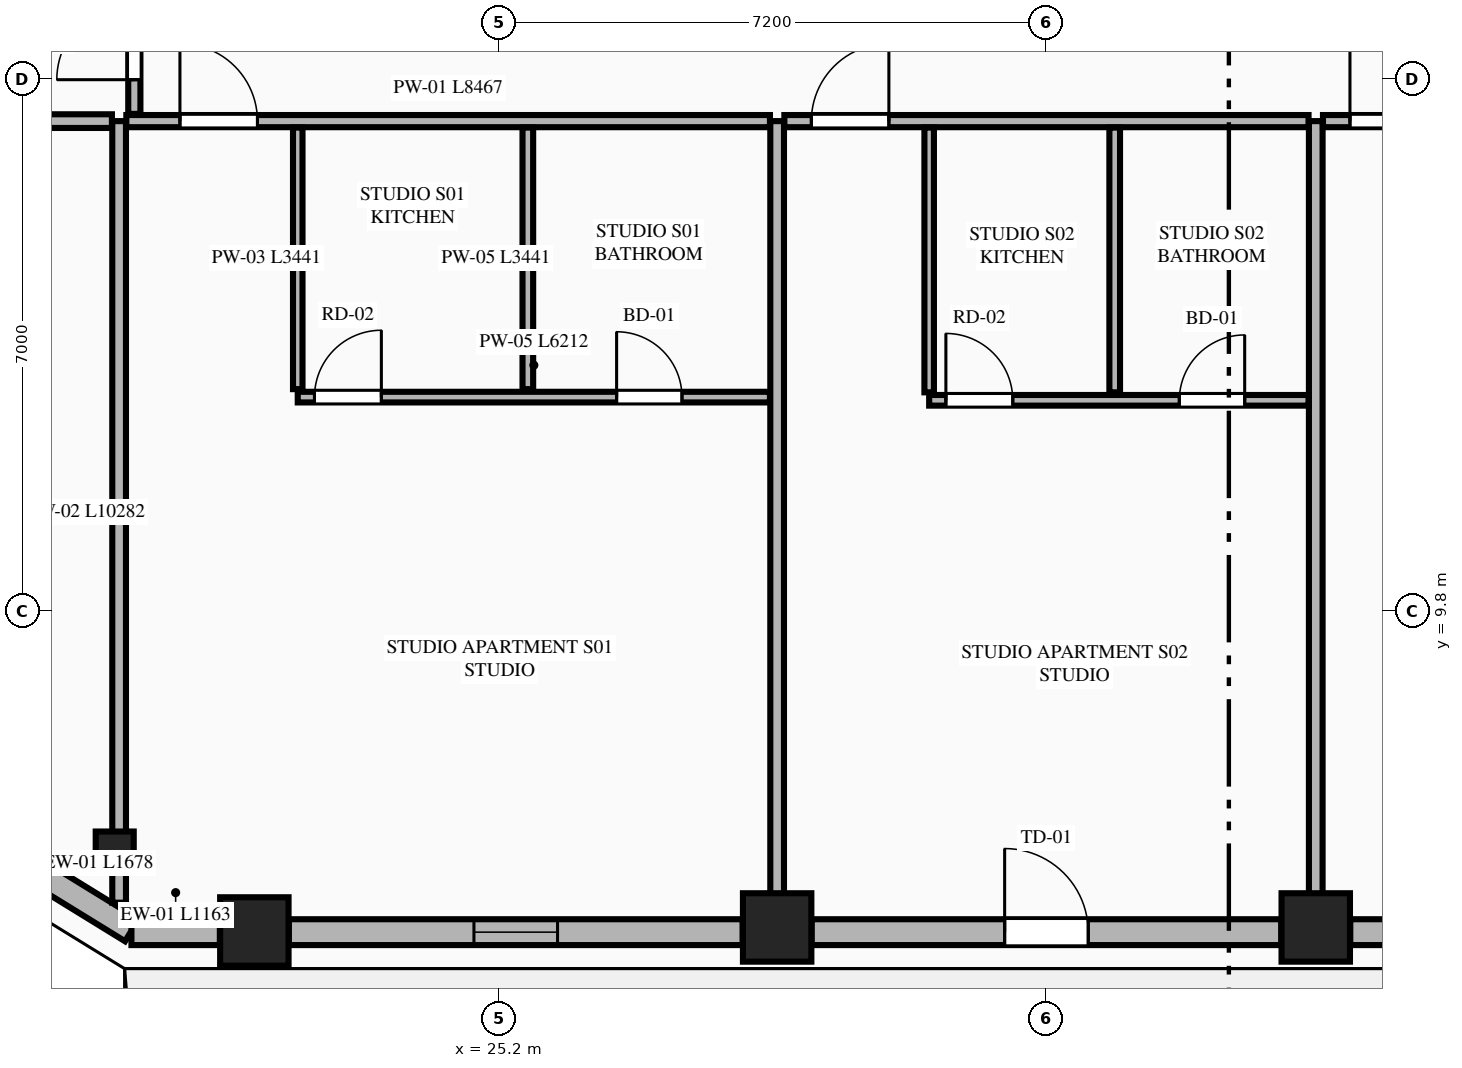
"""IFC4 building model, lengths in metres.
Left out: names, types, materials, properties, quantities, classifications, styles, units other than length and angle.
Written with IfcOpenShell. Run it as: python <this file> out.ifc"""

import sys

from ifc_helpers import new_model, si_unit, direction, frame, frame_2d, origin, origin_2d, place, context, subcontext, project, spatial, rectangle, extrude, element, fill, save


model = new_model("IFC4")
c1 = context("Model", 3, precision=1e-05, world=origin(), true_north=direction((0.0, 1.0)))
c2 = subcontext(c1, "Body", "Model", "MODEL_VIEW")
j1 = project(units=[si_unit("LENGTHUNIT", "METRE"), si_unit("PLANEANGLEUNIT", "RADIAN")], contexts=[c1])
p1 = place(None, origin())
s1 = spatial("IfcSite", under=j1, at=p1, CompositionType="ELEMENT")
p2 = place(p1, origin())
s2 = spatial("IfcBuilding", under=s1, at=p2, CompositionType="ELEMENT")
p3 = place(p2, frame((0.0, 0.0, 186.1)))
s3 = spatial("IfcBuildingStorey", under=s2, at=p3, CompositionType="ELEMENT", Elevation=186.1)
for number, where, z_axis, x_axis in (
    (1, (21.979, 5.589, 0.0), (0.0, 0.0, 1.0), (1.0, 0.0, 0.0)),
    (2, (28.857, 5.642, 0.0), (0.0, 0.0, 1.0), (1.0, 0.0, 0.0)),
    (3, (35.943, 5.642, 0.0), (0.0, 0.0, 1.0), (1.0, 0.0, 0.0)),
):
    element("IfcColumn", number, at=place(p3, frame(where, z_axis=z_axis, x_axis=x_axis)), inside=s3, PredefinedType="COLUMN", context=c2, shape_type="SweptSolid", body=[
        extrude(rectangle(XDim=0.9, YDim=0.9, at=origin_2d()), origin(), (0.0, 0.0, 1.0), 3.55),
    ])
p4 = place(p3, frame((20.142, 6.654, 0.0), z_axis=(0.0, 0.0, 1.0), x_axis=(0.865230187018, -0.501374833306, 0.0)))
e4 = element("IfcColumn", 4, at=p4, inside=s3, PredefinedType="PILASTER", context=c2, shape_type="SweptSolid", body=[
    extrude(rectangle(XDim=0.5, YDim=0.35, at=origin_2d()), origin(), (0.0, 0.0, 1.0), 3.55),
])
p5 = place(p3, frame((18.938, 6.484, 0.0), z_axis=(0.0, 0.0, 1.0), x_axis=(0.851778214877, -0.523902541185, 0.0)))
e5 = element("IfcWall", 5, at=p5, inside=s3, PredefinedType="STANDARD", context=c2, shape_type="SweptSolid", body=[
    extrude(rectangle(XDim=1.678, YDim=0.34, at=frame_2d((0.839, 0.0))), origin(), (0.0, 0.0, 1.0), 3.35),
])
p6 = place(p3, frame((20.362, 5.58, 0.0), z_axis=(0.0, 0.0, 1.0), x_axis=(1.0, 0.0, 0.0)))
e6 = element("IfcWall", 6, at=p6, inside=s3, PredefinedType="STANDARD", context=c2, shape_type="SweptSolid", body=[
    extrude(rectangle(XDim=1.163, YDim=0.34, at=frame_2d((0.582, 0.0))), origin(), (0.0, 0.0, 1.0), 3.35),
])
p7 = place(p3, frame((22.433, 5.58, 0.0), z_axis=(0.0, 0.0, 1.0), x_axis=(1.0, 0.0, 0.0)))
e7 = element("IfcWall", 7, at=p7, inside=s3, PredefinedType="STANDARD", context=c2, shape_type="SweptSolid", body=[
    extrude(rectangle(XDim=5.97, YDim=0.34, at=frame_2d((2.985, 0.0))), origin(), (0.0, 0.0, 1.0), 2.883),
])
p8 = place(p7, frame((2.435, 0.0, 0.75)))
e8 = element("IfcOpeningElement", 8, at=p8, cuts=e7, PredefinedType="OPENING", context=c2, shape_type="SweptSolid", body=[
    extrude(rectangle(XDim=1.1, YDim=1.983, at=frame_2d((0.55, 0.991))), frame((0.0, 0.18, 0.0), z_axis=(0.0, -1.0, 0.0), x_axis=(1.0, 0.0, 0.0)), (0.0, 0.0, 1.0), 0.36),
])
p9 = place(p3, frame((29.311, 5.58, 0.0), z_axis=(0.0, 0.0, 1.0), x_axis=(1.0, 0.0, 0.0)))
e9 = element("IfcWall", 9, at=p9, inside=s3, PredefinedType="STANDARD", context=c2, shape_type="SweptSolid", body=[
    extrude(rectangle(XDim=6.178, YDim=0.34, at=frame_2d((3.089, 0.0))), origin(), (0.0, 0.0, 1.0), 2.883),
])
p10 = place(p9, frame((2.539, 0.0, 0.0)))
e10 = element("IfcOpeningElement", 10, at=p10, cuts=e9, PredefinedType="OPENING", context=c2, shape_type="SweptSolid", body=[
    extrude(rectangle(XDim=1.1, YDim=2.25, at=frame_2d((0.55, 1.125))), frame((0.0, 0.18, 0.0), z_axis=(0.0, -1.0, 0.0), x_axis=(1.0, 0.0, 0.0)), (0.0, 0.0, 1.0), 0.36),
])
p11 = place(p3, frame((36.397, 5.58, 0.0), z_axis=(0.0, 0.0, 1.0), x_axis=(1.0, 0.0, 0.0)))
e11 = element("IfcWall", 11, at=p11, inside=s3, PredefinedType="STANDARD", context=c2, shape_type="SweptSolid", body=[
    extrude(rectangle(XDim=5.97, YDim=0.34, at=frame_2d((2.985, 0.0))), origin(), (0.0, 0.0, 1.0), 2.883),
])
p12 = place(p11, frame((2.435, 0.0, 0.75)))
e12 = element("IfcOpeningElement", 12, at=p12, cuts=e11, PredefinedType="OPENING", context=c2, shape_type="SweptSolid", body=[
    extrude(rectangle(XDim=1.1, YDim=1.983, at=frame_2d((0.55, 0.991))), frame((0.0, 0.18, 0.0), z_axis=(0.0, -1.0, 0.0), x_axis=(1.0, 0.0, 0.0)), (0.0, 0.0, 1.0), 0.36),
])
p13 = place(p3, frame((20.2, 5.968, 0.0), z_axis=(0.0, 0.0, 1.0), x_axis=(0.0, 1.0, 0.0)))
e13 = element("IfcWall", 13, at=p13, inside=s3, PredefinedType="PARTITIONING", context=c2, shape_type="SweptSolid", body=[
    extrude(rectangle(XDim=10.282, YDim=0.18, at=frame_2d((5.141, 0.0))), origin(), (0.0, 0.0, 1.0), 3.35),
])
for number, where, z_axis, x_axis in (
    (14, (28.857, 5.755, 0.0), (0.0, 0.0, 1.0), (0.0, 1.0, 0.0)),
    (15, (35.943, 5.755, 0.0), (0.0, 0.0, 1.0), (0.0, 1.0, 0.0)),
):
    element("IfcWall", number, at=place(p3, frame(where, z_axis=z_axis, x_axis=x_axis)), inside=s3, PredefinedType="PARTITIONING", context=c2, shape_type="SweptSolid", body=[
        extrude(rectangle(XDim=10.495, YDim=0.18, at=frame_2d((5.248, 0.0))), origin(), (0.0, 0.0, 1.0), 2.807),
    ])
p14 = place(p3, frame((20.295, 16.25, 0.0), z_axis=(0.0, 0.0, 1.0), x_axis=(1.0, 0.0, 0.0)))
e16 = element("IfcWall", 16, at=p14, inside=s3, PredefinedType="PARTITIONING", context=c2, shape_type="SweptSolid", body=[
    extrude(rectangle(XDim=8.467, YDim=0.16, at=frame_2d((4.233, 0.0))), origin(), (0.0, 0.0, 1.0), 3.35),
])
p15 = place(p14, frame((0.705, 0.0, 0.0)))
e17 = element("IfcOpeningElement", 17, at=p15, cuts=e16, PredefinedType="OPENING", context=c2, shape_type="SweptSolid", body=[
    extrude(rectangle(XDim=1.02, YDim=2.25, at=frame_2d((0.51, 1.125))), frame((0.0, 0.09, 0.0), z_axis=(0.0, -1.0, 0.0), x_axis=(1.0, 0.0, 0.0)), (0.0, 0.0, 1.0), 0.18),
])
p16 = place(p3, frame((22.55, 12.724, 0.0), z_axis=(0.0, 0.0, 1.0), x_axis=(0.0, 1.0, 0.0)))
e18 = element("IfcWall", 18, at=p16, inside=s3, PredefinedType="PARTITIONING", context=c2, shape_type="SweptSolid", body=[
    extrude(rectangle(XDim=3.441, YDim=0.125, at=frame_2d((1.72, 0.0))), origin(), (0.0, 0.0, 1.0), 2.807),
])
p17 = place(p3, frame((22.55, 12.619, 0.0), z_axis=(0.0, 0.0, 1.0), x_axis=(1.0, 0.0, 0.0)))
e19 = element("IfcWall", 19, at=p17, inside=s3, PredefinedType="PLUMBINGWALL", context=c2, shape_type="SweptSolid", body=[
    extrude(rectangle(XDim=6.212, YDim=0.14, at=frame_2d((3.106, 0.0))), origin(), (0.0, 0.0, 1.0), 3.35),
])
p18 = place(p17, frame((4.195, 0.0, 0.0)))
e20 = element("IfcOpeningElement", 20, at=p18, cuts=e19, PredefinedType="OPENING", context=c2, shape_type="SweptSolid", body=[
    extrude(rectangle(XDim=0.86, YDim=2.1, at=frame_2d((0.43, 1.05))), frame((0.0, 0.08, 0.0), z_axis=(0.0, -1.0, 0.0), x_axis=(1.0, 0.0, 0.0)), (0.0, 0.0, 1.0), 0.16),
])
p19 = place(p17, frame((0.22, 0.0, 0.0)))
e21 = element("IfcOpeningElement", 21, at=p19, cuts=e19, PredefinedType="OPENING", context=c2, shape_type="SweptSolid", body=[
    extrude(rectangle(XDim=0.88, YDim=2.15, at=frame_2d((0.44, 1.075))), frame((0.0, 0.08, 0.0), z_axis=(0.0, -1.0, 0.0), x_axis=(1.0, 0.0, 0.0)), (0.0, 0.0, 1.0), 0.16),
])
p20 = place(p3, frame((25.577, 12.724, 0.0), z_axis=(0.0, 0.0, 1.0), x_axis=(0.0, 1.0, 0.0)))
e22 = element("IfcWall", 22, at=p20, inside=s3, PredefinedType="PLUMBINGWALL", context=c2, shape_type="SweptSolid", body=[
    extrude(rectangle(XDim=3.441, YDim=0.14, at=frame_2d((1.72, 0.0))), origin(), (0.0, 0.0, 1.0), 3.35),
])
p21 = place(p3, frame((28.952, 16.25, 0.0), z_axis=(0.0, 0.0, 1.0), x_axis=(1.0, 0.0, 0.0)))
e23 = element("IfcWall", 23, at=p21, inside=s3, PredefinedType="PARTITIONING", context=c2, shape_type="SweptSolid", body=[
    extrude(rectangle(XDim=6.896, YDim=0.16, at=frame_2d((3.448, 0.0))), origin(), (0.0, 0.0, 1.0), 3.35),
])
p22 = place(p21, frame((0.355, 0.0, 0.0)))
e24 = element("IfcOpeningElement", 24, at=p22, cuts=e23, PredefinedType="OPENING", context=c2, shape_type="SweptSolid", body=[
    extrude(rectangle(XDim=1.02, YDim=2.25, at=frame_2d((0.51, 1.125))), frame((0.0, 0.09, 0.0), z_axis=(0.0, -1.0, 0.0), x_axis=(1.0, 0.0, 0.0)), (0.0, 0.0, 1.0), 0.18),
])
p23 = place(p3, frame((30.857, 12.682, 0.0), z_axis=(0.0, 0.0, 1.0), x_axis=(0.0, 1.0, 0.0)))
e25 = element("IfcWall", 25, at=p23, inside=s3, PredefinedType="PARTITIONING", context=c2, shape_type="SweptSolid", body=[
    extrude(rectangle(XDim=3.483, YDim=0.125, at=frame_2d((1.742, 0.0))), origin(), (0.0, 0.0, 1.0), 3.35),
])
p24 = place(p3, frame((30.857, 12.577, 0.0), z_axis=(0.0, 0.0, 1.0), x_axis=(1.0, 0.0, 0.0)))
e26 = element("IfcWall", 26, at=p24, inside=s3, PredefinedType="PLUMBINGWALL", context=c2, shape_type="SweptSolid", body=[
    extrude(rectangle(XDim=4.991, YDim=0.14, at=frame_2d((2.496, 0.0))), origin(), (0.0, 0.0, 1.0), 3.35),
])
p25 = place(p24, frame((3.291, 0.0, 0.0)))
e27 = element("IfcOpeningElement", 27, at=p25, cuts=e26, PredefinedType="OPENING", context=c2, shape_type="SweptSolid", body=[
    extrude(rectangle(XDim=0.86, YDim=2.1, at=frame_2d((0.43, 1.05))), frame((0.0, 0.08, 0.0), z_axis=(0.0, -1.0, 0.0), x_axis=(1.0, 0.0, 0.0)), (0.0, 0.0, 1.0), 0.16),
])
p26 = place(p24, frame((0.22, 0.0, 0.0)))
e28 = element("IfcOpeningElement", 28, at=p26, cuts=e26, PredefinedType="OPENING", context=c2, shape_type="SweptSolid", body=[
    extrude(rectangle(XDim=0.88, YDim=2.15, at=frame_2d((0.44, 1.075))), frame((0.0, 0.08, 0.0), z_axis=(0.0, -1.0, 0.0), x_axis=(1.0, 0.0, 0.0)), (0.0, 0.0, 1.0), 0.16),
])
p27 = place(p3, frame((33.298, 12.682, 0.0), z_axis=(0.0, 0.0, 1.0), x_axis=(0.0, 1.0, 0.0)))
e29 = element("IfcWall", 29, at=p27, inside=s3, PredefinedType="PLUMBINGWALL", context=c2, shape_type="SweptSolid", body=[
    extrude(rectangle(XDim=3.483, YDim=0.14, at=frame_2d((1.742, 0.0))), origin(), (0.0, 0.0, 1.0), 3.35),
])
p28 = place(p3, frame((36.038, 16.25, 0.0), z_axis=(0.0, 0.0, 1.0), x_axis=(1.0, 0.0, 0.0)))
e30 = element("IfcWall", 30, at=p28, inside=s3, PredefinedType="PARTITIONING", context=c2, shape_type="SweptSolid", body=[
    extrude(rectangle(XDim=8.467, YDim=0.16, at=frame_2d((4.233, 0.0))), origin(), (0.0, 0.0, 1.0), 3.35),
])
p29 = place(p28, frame((0.355, 0.0, 0.0)))
e31 = element("IfcOpeningElement", 31, at=p29, cuts=e30, PredefinedType="OPENING", context=c2, shape_type="SweptSolid", body=[
    extrude(rectangle(XDim=1.02, YDim=2.25, at=frame_2d((0.51, 1.125))), frame((0.0, 0.09, 0.0), z_axis=(0.0, -1.0, 0.0), x_axis=(1.0, 0.0, 0.0)), (0.0, 0.0, 1.0), 0.18),
])
p30 = place(p3, frame((14.211, 16.25, 0.0), z_axis=(0.0, 0.0, 1.0), x_axis=(1.0, 0.0, 0.0)))
e32 = element("IfcWall", 32, at=p30, inside=s3, PredefinedType="PARTITIONING", context=c2, shape_type="SweptSolid", body=[
    extrude(rectangle(XDim=5.894, YDim=0.18, at=frame_2d((2.947, 0.0))), origin(), (0.0, 0.0, 1.0), 3.35),
])
p31 = place(p3, frame((20.4, 16.345, 0.0), z_axis=(0.0, 0.0, 1.0), x_axis=(0.0, 1.0, 0.0)))
e33 = element("IfcWall", 33, at=p31, inside=s3, PredefinedType="PARTITIONING", context=c2, shape_type="SweptSolid", body=[
    extrude(rectangle(XDim=8.504, YDim=0.16, at=frame_2d((4.252, 0.0))), origin(), (0.0, 0.0, 1.0), 3.35),
])
p32 = place(p31, frame((0.45, 0.0, 0.0)))
e34 = element("IfcOpeningElement", 34, at=p32, cuts=e33, PredefinedType="OPENING", context=c2, shape_type="SweptSolid", body=[
    extrude(rectangle(XDim=1.02, YDim=2.25, at=frame_2d((0.51, 1.125))), frame((0.0, 0.09, 0.0), z_axis=(0.0, -1.0, 0.0), x_axis=(1.0, 0.0, 0.0)), (0.0, 0.0, 1.0), 0.18),
])
p33 = place(p8, origin())
e35 = element("IfcWindow", 35, at=p33, inside=s3, PartitioningType="SINGLE_PANEL", PredefinedType="WINDOW", context=c2, shape_type="SweptSolid", body=[
    extrude(rectangle(XDim=1.1, YDim=1.983, at=frame_2d((0.55, 0.991))), frame((0.0, 0.03, 0.0), z_axis=(0.0, -1.0, 0.0), x_axis=(1.0, 0.0, 0.0)), (0.0, 0.0, 1.0), 0.06),
])
fill(e8, e35)
p34 = place(p10, origin())
e36 = element("IfcDoor", 36, at=p34, inside=s3, OperationType="SINGLE_SWING_LEFT", PredefinedType="DOOR", context=c2, shape_type="SweptSolid", body=[
    extrude(rectangle(XDim=1.1, YDim=2.25, at=frame_2d((0.55, 1.125))), frame((0.0, 0.025, 0.0), z_axis=(0.0, -1.0, 0.0), x_axis=(1.0, 0.0, 0.0)), (0.0, 0.0, 1.0), 0.05),
])
fill(e10, e36)
p35 = place(p18, origin())
e37 = element("IfcDoor", 37, at=p35, inside=s3, OperationType="SINGLE_SWING_LEFT", PredefinedType="DOOR", context=c2, shape_type="SweptSolid", body=[
    extrude(rectangle(XDim=0.86, YDim=2.1, at=frame_2d((0.43, 1.05))), frame((0.0, 0.025, 0.0), z_axis=(0.0, -1.0, 0.0), x_axis=(1.0, 0.0, 0.0)), (0.0, 0.0, 1.0), 0.05),
])
fill(e20, e37)
p36 = place(p15, origin())
e38 = element("IfcDoor", 38, at=p36, inside=s3, OperationType="SINGLE_SWING_LEFT", PredefinedType="DOOR", context=c2, shape_type="SweptSolid", body=[
    extrude(rectangle(XDim=1.02, YDim=2.25, at=frame_2d((0.51, 1.125))), frame((0.0, 0.025, 0.0), z_axis=(0.0, -1.0, 0.0), x_axis=(1.0, 0.0, 0.0)), (0.0, 0.0, 1.0), 0.05),
])
fill(e17, e38)
p37 = place(p19, origin())
e39 = element("IfcDoor", 39, at=p37, inside=s3, OperationType="SINGLE_SWING_RIGHT", PredefinedType="DOOR", context=c2, shape_type="SweptSolid", body=[
    extrude(rectangle(XDim=0.88, YDim=2.15, at=frame_2d((0.44, 1.075))), frame((0.0, 0.025, 0.0), z_axis=(0.0, -1.0, 0.0), x_axis=(1.0, 0.0, 0.0)), (0.0, 0.0, 1.0), 0.05),
])
fill(e21, e39)
p38 = place(p25, origin())
e40 = element("IfcDoor", 40, at=p38, inside=s3, OperationType="SINGLE_SWING_RIGHT", PredefinedType="DOOR", context=c2, shape_type="SweptSolid", body=[
    extrude(rectangle(XDim=0.86, YDim=2.1, at=frame_2d((0.43, 1.05))), frame((0.0, 0.025, 0.0), z_axis=(0.0, -1.0, 0.0), x_axis=(1.0, 0.0, 0.0)), (0.0, 0.0, 1.0), 0.05),
])
fill(e27, e40)
p39 = place(p22, origin())
e41 = element("IfcDoor", 41, at=p39, inside=s3, OperationType="SINGLE_SWING_RIGHT", PredefinedType="DOOR", context=c2, shape_type="SweptSolid", body=[
    extrude(rectangle(XDim=1.02, YDim=2.25, at=frame_2d((0.51, 1.125))), frame((0.0, 0.025, 0.0), z_axis=(0.0, -1.0, 0.0), x_axis=(1.0, 0.0, 0.0)), (0.0, 0.0, 1.0), 0.05),
])
fill(e24, e41)
p40 = place(p26, origin())
e42 = element("IfcDoor", 42, at=p40, inside=s3, OperationType="SINGLE_SWING_LEFT", PredefinedType="DOOR", context=c2, shape_type="SweptSolid", body=[
    extrude(rectangle(XDim=0.88, YDim=2.15, at=frame_2d((0.44, 1.075))), frame((0.0, 0.025, 0.0), z_axis=(0.0, -1.0, 0.0), x_axis=(1.0, 0.0, 0.0)), (0.0, 0.0, 1.0), 0.05),
])
fill(e28, e42)
p41 = place(p29, origin())
e43 = element("IfcDoor", 43, at=p41, inside=s3, OperationType="SINGLE_SWING_LEFT", PredefinedType="DOOR", context=c2, shape_type="SweptSolid", body=[
    extrude(rectangle(XDim=1.02, YDim=2.25, at=frame_2d((0.51, 1.125))), frame((0.0, 0.025, 0.0), z_axis=(0.0, -1.0, 0.0), x_axis=(1.0, 0.0, 0.0)), (0.0, 0.0, 1.0), 0.05),
])
fill(e31, e43)
p42 = place(p32, origin())
e44 = element("IfcDoor", 44, at=p42, inside=s3, OperationType="SINGLE_SWING_LEFT", PredefinedType="DOOR", context=c2, shape_type="SweptSolid", body=[
    extrude(rectangle(XDim=1.02, YDim=2.25, at=frame_2d((0.51, 1.125))), frame((0.0, 0.025, 0.0), z_axis=(0.0, -1.0, 0.0), x_axis=(1.0, 0.0, 0.0)), (0.0, 0.0, 1.0), 0.05),
])
fill(e34, e44)
save(model, sys.argv[1])
